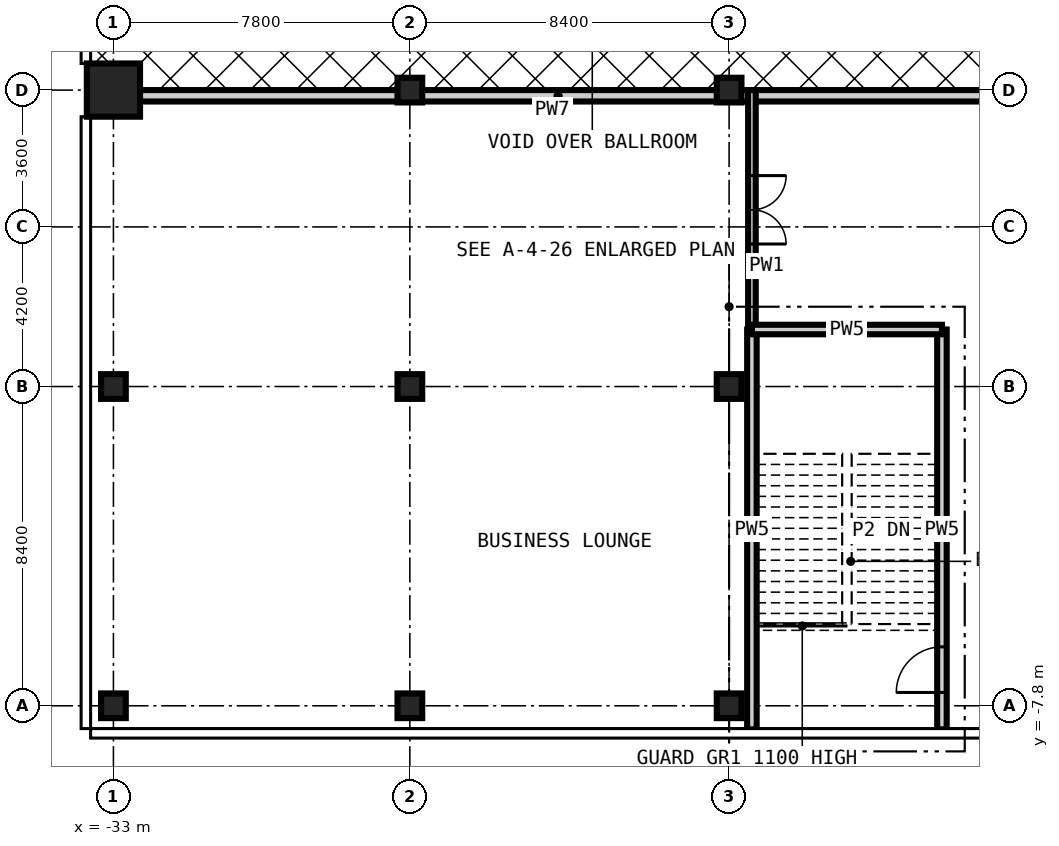
"""IFC4 building model, lengths in metres.
Left out: names, types, materials, properties, quantities, classifications, styles, units other than length and angle.
Written with IfcOpenShell. Run it as: python <this file> out.ifc"""

import sys

from ifc_helpers import new_model, si_unit, direction, frame, frame_2d, origin, origin_2d, place, context, subcontext, project, spatial, rectangle, extrude, element, fill, save


model = new_model("IFC4")
c1 = context("Model", 3, precision=1e-05, world=origin(), true_north=direction((0.0, 1.0)))
c2 = subcontext(c1, "Body", "Model", "MODEL_VIEW")
j1 = project(units=[si_unit("LENGTHUNIT", "METRE"), si_unit("PLANEANGLEUNIT", "RADIAN")], contexts=[c1])
p1 = place(None, origin())
s1 = spatial("IfcSite", under=j1, at=p1, CompositionType="ELEMENT")
p2 = place(p1, origin())
s2 = spatial("IfcBuilding", under=s1, at=p2, CompositionType="ELEMENT")
p3 = place(p2, frame((0.0, 0.0, 12.0)))
s3 = spatial("IfcBuildingStorey", under=s2, at=p3, CompositionType="ELEMENT", Elevation=12.0)
for number, where, z_axis, x_axis in (
    (1, (-33.0, -7.8, -0.3), (0.0, 0.0, 1.0), (1.0, 0.0, 0.0)),
    (2, (-33.0, 0.6, -0.3), (0.0, 0.0, 1.0), (1.0, 0.0, 0.0)),
):
    element("IfcColumn", number, at=place(p3, frame(where, z_axis=z_axis, x_axis=x_axis)), inside=s3, PredefinedType="COLUMN", context=c2, shape_type="SweptSolid", body=[
        extrude(rectangle(XDim=0.65, YDim=0.65, at=origin_2d()), origin(), (0.0, 0.0, 1.0), 5.0),
    ])
p4 = place(p3, frame((-33.0, 8.4, -0.3), z_axis=(0.0, 0.0, 1.0), x_axis=(1.0, 0.0, 0.0)))
e3 = element("IfcColumn", 3, at=p4, inside=s3, PredefinedType="COLUMN", context=c2, shape_type="SweptSolid", body=[
    extrude(rectangle(XDim=1.4, YDim=1.4, at=origin_2d()), origin(), (0.0, 0.0, 1.0), 5.0),
])
for number, where, z_axis, x_axis in (
    (4, (-25.2, -7.8, -0.3), (0.0, 0.0, 1.0), (1.0, 0.0, 0.0)),
    (5, (-25.2, 0.6, -0.3), (0.0, 0.0, 1.0), (1.0, 0.0, 0.0)),
    (6, (-25.2, 8.4, -0.3), (0.0, 0.0, 1.0), (1.0, 0.0, 0.0)),
    (7, (-16.8, -7.8, -0.3), (0.0, 0.0, 1.0), (1.0, 0.0, 0.0)),
    (8, (-16.8, 0.6, -0.3), (0.0, 0.0, 1.0), (1.0, 0.0, 0.0)),
    (9, (-16.8, 8.4, -0.3), (0.0, 0.0, 1.0), (1.0, 0.0, 0.0)),
):
    element("IfcColumn", number, at=place(p3, frame(where, z_axis=z_axis, x_axis=x_axis)), inside=s3, PredefinedType="COLUMN", context=c2, shape_type="SweptSolid", body=[
        extrude(rectangle(XDim=0.65, YDim=0.65, at=origin_2d()), origin(), (0.0, 0.0, 1.0), 5.0),
    ])
p5 = place(p3, frame((-9.0, 8.25, 0.0), z_axis=(0.0, 0.0, 1.0), x_axis=(-1.0, 0.0, 0.0)))
e10 = element("IfcWall", 10, at=p5, inside=s3, PredefinedType="PARTITIONING", context=c2, shape_type="SweptSolid", body=[
    extrude(rectangle(XDim=24.6, YDim=0.3, at=frame_2d((12.3, 0.0))), origin(), (0.0, 0.0, 1.0), 3.779),
])
p6 = place(p3, frame((-16.2, 8.4, 0.0), z_axis=(0.0, 0.0, 1.0), x_axis=(0.0, -1.0, 0.0)))
e11 = element("IfcWall", 11, at=p6, inside=s3, PredefinedType="PARTITIONING", context=c2, shape_type="SweptSolid", body=[
    extrude(rectangle(XDim=6.3, YDim=0.2, at=frame_2d((3.15, 0.0))), origin(), (0.0, 0.0, 1.0), 4.7),
])
p7 = place(p6, frame((2.25, 0.0, 0.0)))
e12 = element("IfcOpeningElement", 12, at=p7, cuts=e11, PredefinedType="OPENING", context=c2, shape_type="SweptSolid", body=[
    extrude(rectangle(XDim=1.8, YDim=2.4, at=frame_2d((0.9, 1.2))), frame((0.0, 0.11, 0.0), z_axis=(0.0, -1.0, 0.0), x_axis=(1.0, 0.0, 0.0)), (0.0, 0.0, 1.0), 0.22),
])
p8 = place(p3, frame((-16.2, -8.423, 0.0), z_axis=(0.0, 0.0, 1.0), x_axis=(0.0, 1.0, 0.0)))
e13 = element("IfcWall", 13, at=p8, inside=s3, PredefinedType="PARTITIONING", context=c2, shape_type="SweptSolid", body=[
    extrude(rectangle(XDim=10.523, YDim=0.25, at=frame_2d((5.262, 0.0))), origin(), (0.0, 0.0, 1.0), 4.7),
])
p9 = place(p3, frame((-11.2, -8.423, 0.0), z_axis=(0.0, 0.0, 1.0), x_axis=(0.0, 1.0, 0.0)))
e14 = element("IfcWall", 14, at=p9, inside=s3, PredefinedType="PARTITIONING", context=c2, shape_type="SweptSolid", body=[
    extrude(rectangle(XDim=10.523, YDim=0.25, at=frame_2d((5.262, 0.0))), origin(), (0.0, 0.0, 1.0), 4.7),
])
p10 = place(p9, frame((0.973, 0.0, 0.0)))
e15 = element("IfcOpeningElement", 15, at=p10, cuts=e14, PredefinedType="OPENING", context=c2, shape_type="SweptSolid", body=[
    extrude(rectangle(XDim=1.2, YDim=2.2, at=frame_2d((0.6, 1.1))), frame((0.0, 0.135, 0.0), z_axis=(0.0, -1.0, 0.0), x_axis=(1.0, 0.0, 0.0)), (0.0, 0.0, 1.0), 0.27),
])
p11 = place(p3, frame((-16.2, 2.1, 0.0), z_axis=(0.0, 0.0, 1.0), x_axis=(1.0, 0.0, 0.0)))
e16 = element("IfcWall", 16, at=p11, inside=s3, PredefinedType="PARTITIONING", context=c2, shape_type="SweptSolid", body=[
    extrude(rectangle(XDim=5.0, YDim=0.25, at=frame_2d((2.5, 0.0))), origin(), (0.0, 0.0, 1.0), 4.7),
])
p12 = place(p10, origin())
e17 = element("IfcDoor", 17, at=p12, inside=s3, OperationType="SINGLE_SWING_LEFT", PredefinedType="DOOR", context=c2, shape_type="SweptSolid", body=[
    extrude(rectangle(XDim=1.2, YDim=2.2, at=frame_2d((0.6, 1.1))), frame((0.0, 0.025, 0.0), z_axis=(0.0, -1.0, 0.0), x_axis=(1.0, 0.0, 0.0)), (0.0, 0.0, 1.0), 0.05),
])
fill(e15, e17)
p13 = place(p7, origin())
e18 = element("IfcDoor", 18, at=p13, inside=s3, OperationType="DOUBLE_DOOR_DOUBLE_SWING", PredefinedType="DOOR", context=c2, shape_type="SweptSolid", body=[
    extrude(rectangle(XDim=1.8, YDim=2.4, at=frame_2d((0.9, 1.2))), frame((0.0, 0.025, 0.0), z_axis=(0.0, -1.0, 0.0), x_axis=(1.0, 0.0, 0.0)), (0.0, 0.0, 1.0), 0.05),
])
fill(e12, e18)
save(model, sys.argv[1])
